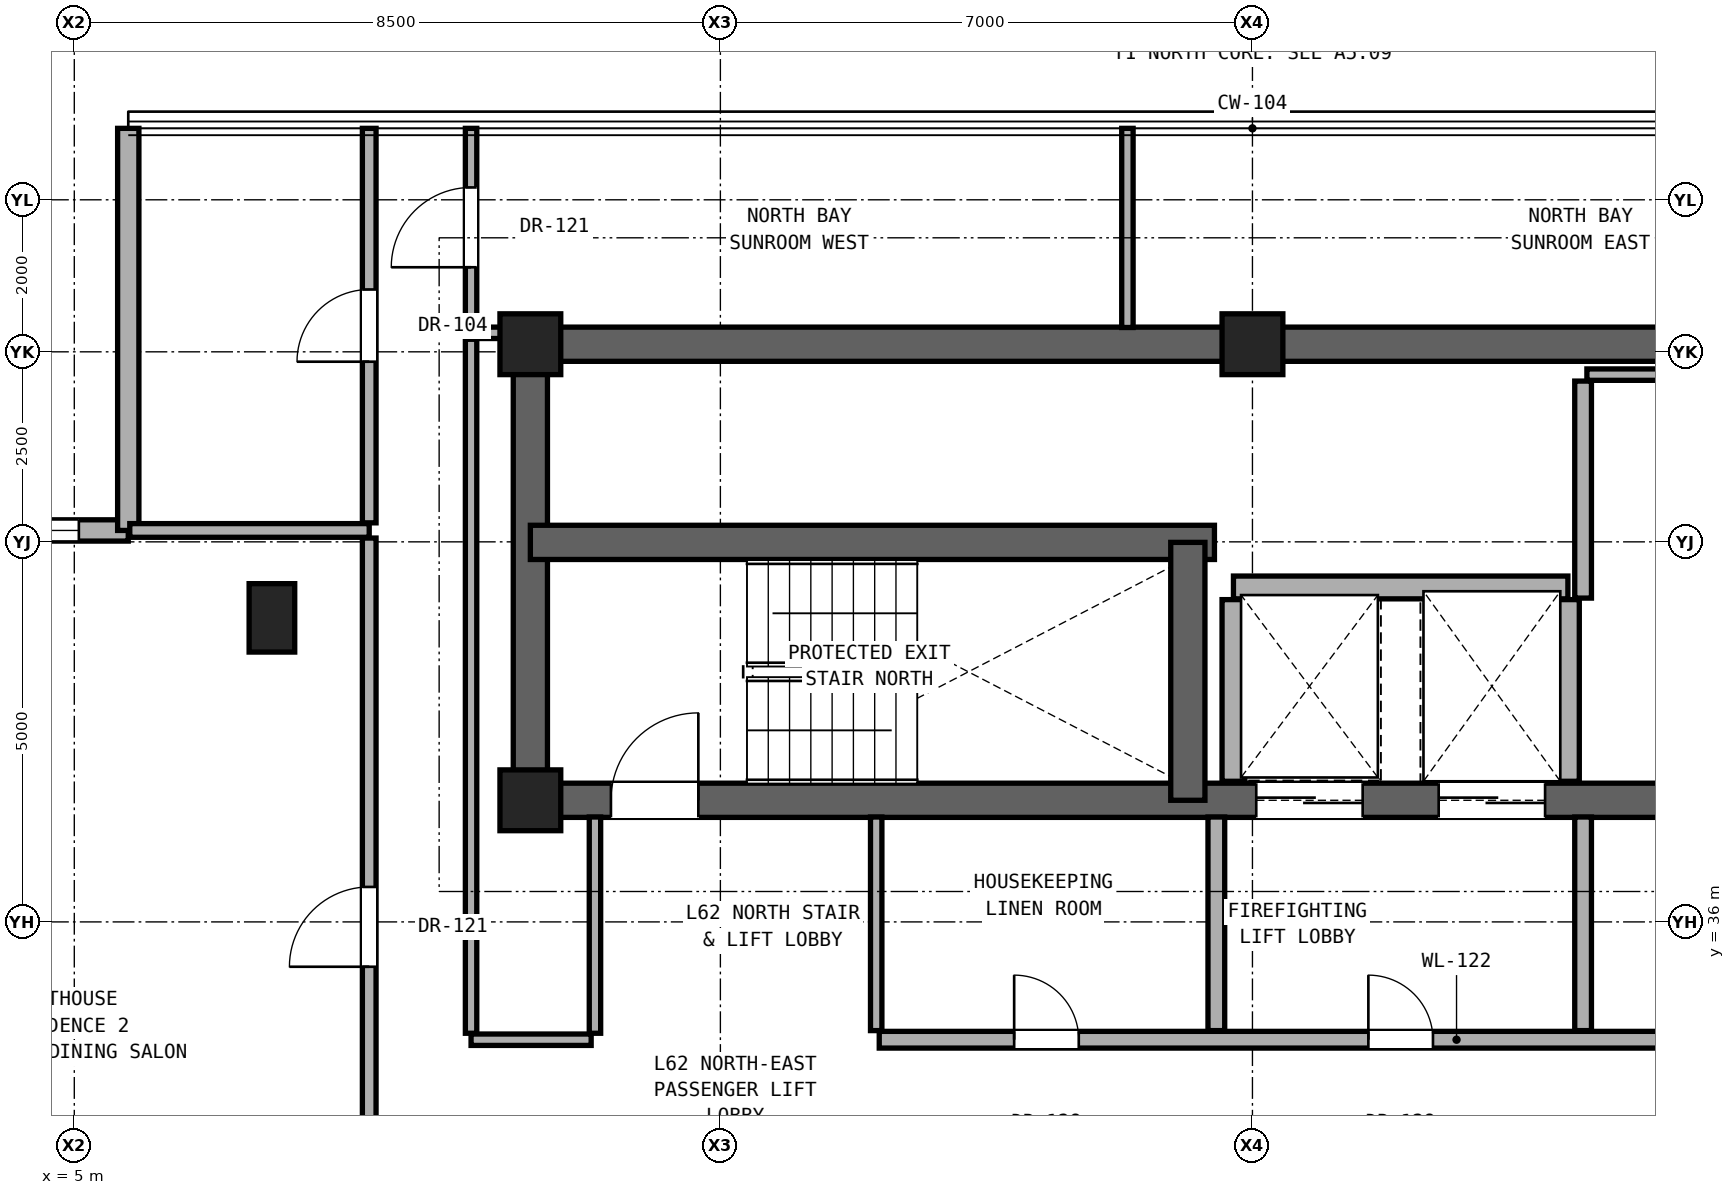
"""IFC4 building model, lengths in metres.
Left out: names, types, materials, properties, quantities, classifications, styles, units other than length and angle.
Written with IfcOpenShell. Run it as: python <this file> out.ifc"""

import sys

from ifc_helpers import new_model, si_unit, direction, frame, frame_2d, origin, origin_2d, place, context, subcontext, project, spatial, rectangle, extrude, element, fill, save


model = new_model("IFC4")
c1 = context("Model", 3, precision=1e-05, world=origin(), true_north=direction((0.0, 1.0)))
c2 = subcontext(c1, "Body", "Model", "MODEL_VIEW")
j1 = project(units=[si_unit("LENGTHUNIT", "METRE"), si_unit("PLANEANGLEUNIT", "RADIAN")], contexts=[c1])
p1 = place(None, origin())
s1 = spatial("IfcSite", under=j1, at=p1, CompositionType="ELEMENT")
p2 = place(p1, origin())
s2 = spatial("IfcBuilding", under=s1, at=p2, CompositionType="ELEMENT")
p3 = place(p2, frame((0.0, 0.0, 219.4)))
s3 = spatial("IfcBuildingStorey", under=s2, at=p3, CompositionType="ELEMENT", Elevation=219.4)
for number, where, z_axis, x_axis in (
    (1, (11.0, 37.6, 0.0), (0.0, 0.0, 1.0), (1.0, 0.0, 0.0)),
    (2, (11.0, 43.6, 0.0), (0.0, 0.0, 1.0), (1.0, 0.0, 0.0)),
    (3, (20.5, 43.6, 0.0), (0.0, 0.0, 1.0), (1.0, 0.0, 0.0)),
):
    element("IfcColumn", number, at=place(p3, frame(where, z_axis=z_axis, x_axis=x_axis)), inside=s3, PredefinedType="COLUMN", context=c2, shape_type="SweptSolid", body=[
        extrude(rectangle(XDim=0.8, YDim=0.8, at=origin_2d()), origin(), (0.0, 0.0, 1.0), 3.3),
    ])
p4 = place(p3, frame((7.6, 40.0, 0.0), z_axis=(0.0, 0.0, 1.0), x_axis=(1.0, 0.0, 0.0)))
e4 = element("IfcColumn", 4, at=p4, inside=s3, PredefinedType="PILASTER", context=c2, shape_type="SweptSolid", body=[
    extrude(rectangle(XDim=0.6, YDim=0.9, at=origin_2d()), origin(), (0.0, 0.0, 1.0), 3.3),
])
p5 = place(p3, frame((11.0, 43.6, 0.0), z_axis=(0.0, 0.0, 1.0), x_axis=(1.0, 0.0, 0.0)))
e5 = element("IfcWall", 5, at=p5, inside=s3, PredefinedType="SHEAR", context=c2, shape_type="SweptSolid", body=[
    extrude(rectangle(XDim=19.0, YDim=0.45, at=frame_2d((9.5, 0.0))), origin(), (0.0, 0.0, 1.0), 3.1),
])
p6 = place(p3, frame((11.0, 37.6, 0.0), z_axis=(0.0, 0.0, 1.0), x_axis=(0.0, 1.0, 0.0)))
e6 = element("IfcWall", 6, at=p6, inside=s3, PredefinedType="SHEAR", context=c2, shape_type="SweptSolid", body=[
    extrude(rectangle(XDim=6.0, YDim=0.45, at=frame_2d((3.0, 0.0))), origin(), (0.0, 0.0, 1.0), 3.1),
])
p7 = place(p3, frame((11.0, 37.6, 0.0), z_axis=(0.0, 0.0, 1.0), x_axis=(1.0, 0.0, 0.0)))
e7 = element("IfcWall", 7, at=p7, inside=s3, PredefinedType="SHEAR", context=c2, shape_type="SweptSolid", body=[
    extrude(rectangle(XDim=19.0, YDim=0.45, at=frame_2d((9.5, 0.0))), origin(), (0.0, 0.0, 1.0), 3.1),
])
p8 = place(p7, frame((1.06, 0.0, 0.0)))
e8 = element("IfcOpeningElement", 8, at=p8, cuts=e7, PredefinedType="OPENING", context=c2, shape_type="SweptSolid", body=[
    extrude(rectangle(XDim=1.15, YDim=2.2, at=frame_2d((0.575, 1.1))), frame((0.0, 0.235, 0.0), z_axis=(0.0, -1.0, 0.0), x_axis=(1.0, 0.0, 0.0)), (0.0, 0.0, 1.0), 0.47),
])
p9 = place(p7, frame((9.55, 0.0, 0.0)))
e9 = element("IfcOpeningElement", 9, at=p9, cuts=e7, PredefinedType="OPENING", context=c2, shape_type="SweptSolid", body=[
    extrude(rectangle(XDim=1.4, YDim=2.35, at=frame_2d((0.7, 1.175))), frame((0.0, 0.235, 0.0), z_axis=(0.0, -1.0, 0.0), x_axis=(1.0, 0.0, 0.0)), (0.0, 0.0, 1.0), 0.47),
])
p10 = place(p7, frame((11.95, 0.0, 0.0)))
e10 = element("IfcOpeningElement", 10, at=p10, cuts=e7, PredefinedType="OPENING", context=c2, shape_type="SweptSolid", body=[
    extrude(rectangle(XDim=1.4, YDim=2.35, at=frame_2d((0.7, 1.175))), frame((0.0, 0.235, 0.0), z_axis=(0.0, -1.0, 0.0), x_axis=(1.0, 0.0, 0.0)), (0.0, 0.0, 1.0), 0.47),
])
p11 = place(p3, frame((11.0, 40.993, 0.0), z_axis=(0.0, 0.0, 1.0), x_axis=(1.0, 0.0, 0.0)))
e11 = element("IfcWall", 11, at=p11, inside=s3, PredefinedType="SHEAR", context=c2, shape_type="SweptSolid", body=[
    extrude(rectangle(XDim=9.0, YDim=0.45, at=frame_2d((4.5, 0.0))), origin(), (0.0, 0.0, 1.0), 3.1),
])
p12 = place(p3, frame((19.65, 37.6, 0.0), z_axis=(0.0, 0.0, 1.0), x_axis=(0.0, 1.0, 0.0)))
e12 = element("IfcWall", 12, at=p12, inside=s3, PredefinedType="SHEAR", context=c2, shape_type="SweptSolid", body=[
    extrude(rectangle(XDim=3.393, YDim=0.45, at=frame_2d((1.696, 0.0))), origin(), (0.0, 0.0, 1.0), 3.1),
])
p13 = place(p3, frame((5.71, 41.15, 0.0), z_axis=(0.0, 0.0, 1.0), x_axis=(-1.0, 0.0, 0.0)))
e13 = element("IfcWall", 13, at=p13, inside=s3, PredefinedType="SOLIDWALL", context=c2, shape_type="SweptSolid", body=[
    extrude(rectangle(XDim=5.29, YDim=0.28, at=frame_2d((2.645, 0.0))), origin(), (0.0, 0.0, 1.0), 3.08),
])
p14 = place(p13, frame((0.65, 0.0, 0.85)))
e14 = element("IfcOpeningElement", 14, at=p14, cuts=e13, PredefinedType="OPENING", context=c2, shape_type="SweptSolid", body=[
    extrude(rectangle(XDim=1.1, YDim=2.0, at=frame_2d((0.55, 1.0))), frame((0.0, 0.15, 0.0), z_axis=(0.0, -1.0, 0.0), x_axis=(1.0, 0.0, 0.0)), (0.0, 0.0, 1.0), 0.3),
])
p15 = place(p3, frame((5.71, 46.44, 0.0), z_axis=(0.0, 0.0, 1.0), x_axis=(0.0, -1.0, 0.0)))
e15 = element("IfcWall", 15, at=p15, inside=s3, PredefinedType="SOLIDWALL", context=c2, shape_type="SweptSolid", body=[
    extrude(rectangle(XDim=5.29, YDim=0.28, at=frame_2d((2.645, 0.0))), origin(), (0.0, 0.0, 1.0), 3.08),
])
p16 = place(p3, frame((10.22, 34.45, 0.0), z_axis=(0.0, 0.0, 1.0), x_axis=(1.0, 0.0, 0.0)))
e16 = element("IfcWall", 16, at=p16, inside=s3, PredefinedType="PARTITIONING", context=c2, shape_type="SweptSolid", body=[
    extrude(rectangle(XDim=1.58, YDim=0.15, at=frame_2d((0.79, 0.0))), origin(), (0.0, 0.0, 1.0), 2.236),
])
p17 = place(p3, frame((15.59, 34.45, 0.0), z_axis=(0.0, 0.0, 1.0), x_axis=(1.0, 0.0, 0.0)))
e17 = element("IfcWall", 17, at=p17, inside=s3, PredefinedType="SOLIDWALL", context=c2, shape_type="SweptSolid", body=[
    extrude(rectangle(XDim=15.19, YDim=0.22, at=frame_2d((7.595, 0.0))), origin(), (0.0, 0.0, 1.0), 2.236),
])
p18 = place(p17, frame((6.435, 0.0, 0.0)))
e18 = element("IfcOpeningElement", 18, at=p18, cuts=e17, PredefinedType="OPENING", context=c2, shape_type="SweptSolid", body=[
    extrude(rectangle(XDim=0.85, YDim=2.01, at=frame_2d((0.425, 1.005))), frame((0.0, 0.12, 0.0), z_axis=(0.0, -1.0, 0.0), x_axis=(1.0, 0.0, 0.0)), (0.0, 0.0, 1.0), 0.24),
])
p19 = place(p17, frame((11.085, 0.0, 0.0)))
e19 = element("IfcOpeningElement", 19, at=p19, cuts=e17, PredefinedType="OPENING", context=c2, shape_type="SweptSolid", body=[
    extrude(rectangle(XDim=0.95, YDim=2.15, at=frame_2d((0.475, 1.075))), frame((0.0, 0.12, 0.0), z_axis=(0.0, -1.0, 0.0), x_axis=(1.0, 0.0, 0.0)), (0.0, 0.0, 1.0), 0.24),
])
p20 = place(p17, frame((1.775, 0.0, 0.0)))
e20 = element("IfcOpeningElement", 20, at=p20, cuts=e17, PredefinedType="OPENING", context=c2, shape_type="SweptSolid", body=[
    extrude(rectangle(XDim=0.85, YDim=2.01, at=frame_2d((0.425, 1.005))), frame((0.0, 0.12, 0.0), z_axis=(0.0, -1.0, 0.0), x_axis=(1.0, 0.0, 0.0)), (0.0, 0.0, 1.0), 0.24),
])
p21 = place(p3, frame((20.25, 40.4, 0.0), z_axis=(0.0, 0.0, 1.0), x_axis=(1.0, 0.0, 0.0)))
e21 = element("IfcWall", 21, at=p21, inside=s3, PredefinedType="SOLIDWALL", context=c2, shape_type="SweptSolid", body=[
    extrude(rectangle(XDim=4.4, YDim=0.3, at=frame_2d((2.2, 0.0))), origin(), (0.0, 0.0, 1.0), 3.1),
])
p22 = place(p3, frame((5.73, 41.15, 0.0), z_axis=(0.0, 0.0, 1.0), x_axis=(1.0, 0.0, 0.0)))
e22 = element("IfcWall", 22, at=p22, inside=s3, PredefinedType="PARTITIONING", context=c2, shape_type="SweptSolid", body=[
    extrude(rectangle(XDim=3.15, YDim=0.18, at=frame_2d((1.575, 0.0))), origin(), (0.0, 0.0, 1.0), 3.1),
])
p23 = place(p3, frame((24.9, 43.2, 0.0), z_axis=(0.0, 0.0, 1.0), x_axis=(1.0, 0.0, 0.0)))
e23 = element("IfcWall", 23, at=p23, inside=s3, PredefinedType="PARTITIONING", context=c2, shape_type="SweptSolid", body=[
    extrude(rectangle(XDim=4.5, YDim=0.15, at=frame_2d((2.25, 0.0))), origin(), (0.0, 0.0, 1.0), 3.1),
])
p24 = place(p3, frame((10.22, 43.75, 0.0), z_axis=(0.0, 0.0, 1.0), x_axis=(1.0, 0.0, 0.0)))
e24 = element("IfcWall", 24, at=p24, inside=s3, PredefinedType="PARTITIONING", context=c2, shape_type="SweptSolid", body=[
    extrude(rectangle(XDim=0.56, YDim=0.15, at=frame_2d((0.28, 0.0))), origin(), (0.0, 0.0, 1.0), 3.1),
])
p25 = place(p3, frame((8.88, 30.82, 0.0), z_axis=(0.0, 0.0, 1.0), x_axis=(0.0, 1.0, 0.0)))
e25 = element("IfcWall", 25, at=p25, inside=s3, PredefinedType="PARTITIONING", context=c2, shape_type="SweptSolid", body=[
    extrude(rectangle(XDim=10.23, YDim=0.18, at=frame_2d((5.115, 0.0))), origin(), (0.0, 0.0, 1.0), 2.396),
])
p26 = place(p25, frame((4.59, 0.0, 0.0)))
e26 = element("IfcOpeningElement", 26, at=p26, cuts=e25, PredefinedType="OPENING", context=c2, shape_type="SweptSolid", body=[
    extrude(rectangle(XDim=1.05, YDim=2.2, at=frame_2d((0.525, 1.1))), frame((0.0, 0.1, 0.0), z_axis=(0.0, -1.0, 0.0), x_axis=(1.0, 0.0, 0.0)), (0.0, 0.0, 1.0), 0.2),
])
p27 = place(p3, frame((8.88, 41.25, 0.0), z_axis=(0.0, 0.0, 1.0), x_axis=(0.0, 1.0, 0.0)))
e27 = element("IfcWall", 27, at=p27, inside=s3, PredefinedType="PARTITIONING", context=c2, shape_type="SweptSolid", body=[
    extrude(rectangle(XDim=5.19, YDim=0.18, at=frame_2d((2.595, 0.0))), origin(), (0.0, 0.0, 1.0), 3.1),
])
p28 = place(p27, frame((2.12, 0.0, 0.0)))
e28 = element("IfcOpeningElement", 28, at=p28, cuts=e27, PredefinedType="OPENING", context=c2, shape_type="SweptSolid", body=[
    extrude(rectangle(XDim=0.95, YDim=2.15, at=frame_2d((0.475, 1.075))), frame((0.0, 0.1, 0.0), z_axis=(0.0, -1.0, 0.0), x_axis=(1.0, 0.0, 0.0)), (0.0, 0.0, 1.0), 0.2),
])
p29 = place(p3, frame((10.22, 34.535, 0.0), z_axis=(0.0, 0.0, 1.0), x_axis=(0.0, 1.0, 0.0)))
e29 = element("IfcWall", 29, at=p29, inside=s3, PredefinedType="PARTITIONING", context=c2, shape_type="SweptSolid", body=[
    extrude(rectangle(XDim=9.13, YDim=0.15, at=frame_2d((4.565, 0.0))), origin(), (0.0, 0.0, 1.0), 2.492),
])
p30 = place(p3, frame((10.22, 43.835, 0.0), z_axis=(0.0, 0.0, 1.0), x_axis=(0.0, 1.0, 0.0)))
e30 = element("IfcWall", 30, at=p30, inside=s3, PredefinedType="PARTITIONING", context=c2, shape_type="SweptSolid", body=[
    extrude(rectangle(XDim=2.605, YDim=0.15, at=frame_2d((1.302, 0.0))), origin(), (0.0, 0.0, 1.0), 3.1),
])
p31 = place(p30, frame((0.778, 0.0, 0.0)))
e31 = element("IfcOpeningElement", 31, at=p31, cuts=e30, PredefinedType="OPENING", context=c2, shape_type="SweptSolid", body=[
    extrude(rectangle(XDim=1.05, YDim=2.2, at=frame_2d((0.525, 1.1))), frame((0.0, 0.085, 0.0), z_axis=(0.0, -1.0, 0.0), x_axis=(1.0, 0.0, 0.0)), (0.0, 0.0, 1.0), 0.17),
])
p32 = place(p3, frame((11.85, 34.535, 0.0), z_axis=(0.0, 0.0, 1.0), x_axis=(0.0, 1.0, 0.0)))
e32 = element("IfcWall", 32, at=p32, inside=s3, PredefinedType="PARTITIONING", context=c2, shape_type="SweptSolid", body=[
    extrude(rectangle(XDim=2.845, YDim=0.15, at=frame_2d((1.422, 0.0))), origin(), (0.0, 0.0, 1.0), 3.1),
])
p33 = place(p3, frame((15.55, 34.57, 0.0), z_axis=(0.0, 0.0, 1.0), x_axis=(0.0, 1.0, 0.0)))
e33 = element("IfcWall", 33, at=p33, inside=s3, PredefinedType="PARTITIONING", context=c2, shape_type="SweptSolid", body=[
    extrude(rectangle(XDim=2.81, YDim=0.15, at=frame_2d((1.405, 0.0))), origin(), (0.0, 0.0, 1.0), 3.1),
])
p34 = place(p3, frame((18.855, 43.82, 0.0), z_axis=(0.0, 0.0, 1.0), x_axis=(0.0, 1.0, 0.0)))
e34 = element("IfcWall", 34, at=p34, inside=s3, PredefinedType="PARTITIONING", context=c2, shape_type="SweptSolid", body=[
    extrude(rectangle(XDim=2.62, YDim=0.15, at=frame_2d((1.31, 0.0))), origin(), (0.0, 0.0, 1.0), 3.1),
])
p35 = place(p3, frame((20.025, 34.57, 0.0), z_axis=(0.0, 0.0, 1.0), x_axis=(0.0, 1.0, 0.0)))
e35 = element("IfcWall", 35, at=p35, inside=s3, PredefinedType="SOLIDWALL", context=c2, shape_type="SweptSolid", body=[
    extrude(rectangle(XDim=2.81, YDim=0.22, at=frame_2d((1.405, 0.0))), origin(), (0.0, 0.0, 1.0), 3.1),
])
for number, where, z_axis, x_axis in (
    (36, (20.25, 37.85, 0.0), (0.0, 0.0, 1.0), (0.0, 1.0, 0.0)),
    (37, (24.65, 37.85, 0.0), (0.0, 0.0, 1.0), (0.0, 1.0, 0.0)),
):
    element("IfcWall", number, at=place(p3, frame(where, z_axis=z_axis, x_axis=x_axis)), inside=s3, PredefinedType="SOLIDWALL", context=c2, shape_type="SweptSolid", body=[
        extrude(rectangle(XDim=2.39, YDim=0.3, at=frame_2d((1.195, 0.0))), origin(), (0.0, 0.0, 1.0), 3.1),
    ])
p36 = place(p3, frame((24.85, 34.57, 0.0), z_axis=(0.0, 0.0, 1.0), x_axis=(0.0, 1.0, 0.0)))
e38 = element("IfcWall", 38, at=p36, inside=s3, PredefinedType="SOLIDWALL", context=c2, shape_type="SweptSolid", body=[
    extrude(rectangle(XDim=2.81, YDim=0.22, at=frame_2d((1.405, 0.0))), origin(), (0.0, 0.0, 1.0), 3.1),
])
p37 = place(p3, frame((24.85, 40.26, 0.0), z_axis=(0.0, 0.0, 1.0), x_axis=(0.0, 1.0, 0.0)))
e39 = element("IfcWall", 39, at=p37, inside=s3, PredefinedType="SOLIDWALL", context=c2, shape_type="SweptSolid", body=[
    extrude(rectangle(XDim=2.855, YDim=0.22, at=frame_2d((1.427, 0.0))), origin(), (0.0, 0.0, 1.0), 3.1),
])
p38 = place(p14, origin())
e40 = element("IfcWindow", 40, at=p38, inside=s3, PartitioningType="SINGLE_PANEL", PredefinedType="WINDOW", context=c2, shape_type="SweptSolid", body=[
    extrude(rectangle(XDim=1.1, YDim=2.0, at=frame_2d((0.55, 1.0))), frame((0.0, 0.03, 0.0), z_axis=(0.0, -1.0, 0.0), x_axis=(1.0, 0.0, 0.0)), (0.0, 0.0, 1.0), 0.06),
])
fill(e14, e40)
p39 = place(p8, origin())
e41 = element("IfcDoor", 41, at=p39, inside=s3, OperationType="SINGLE_SWING_RIGHT", PredefinedType="DOOR", context=c2, shape_type="SweptSolid", body=[
    extrude(rectangle(XDim=1.15, YDim=2.2, at=frame_2d((0.575, 1.1))), frame((0.0, 0.025, 0.0), z_axis=(0.0, -1.0, 0.0), x_axis=(1.0, 0.0, 0.0)), (0.0, 0.0, 1.0), 0.05),
])
fill(e8, e41)
p40 = place(p18, origin())
e42 = element("IfcDoor", 42, at=p40, inside=s3, OperationType="SINGLE_SWING_LEFT", PredefinedType="DOOR", context=c2, shape_type="SweptSolid", body=[
    extrude(rectangle(XDim=0.85, YDim=2.01, at=frame_2d((0.425, 1.005))), frame((0.0, 0.025, 0.0), z_axis=(0.0, -1.0, 0.0), x_axis=(1.0, 0.0, 0.0)), (0.0, 0.0, 1.0), 0.05),
])
fill(e18, e42)
p41 = place(p20, origin())
e43 = element("IfcDoor", 43, at=p41, inside=s3, OperationType="SINGLE_SWING_LEFT", PredefinedType="DOOR", context=c2, shape_type="SweptSolid", body=[
    extrude(rectangle(XDim=0.85, YDim=2.01, at=frame_2d((0.425, 1.005))), frame((0.0, 0.025, 0.0), z_axis=(0.0, -1.0, 0.0), x_axis=(1.0, 0.0, 0.0)), (0.0, 0.0, 1.0), 0.05),
])
fill(e20, e43)
p42 = place(p26, origin())
e44 = element("IfcDoor", 44, at=p42, inside=s3, OperationType="SINGLE_SWING_LEFT", PredefinedType="DOOR", context=c2, shape_type="SweptSolid", body=[
    extrude(rectangle(XDim=1.05, YDim=2.2, at=frame_2d((0.525, 1.1))), frame((0.0, 0.025, 0.0), z_axis=(0.0, -1.0, 0.0), x_axis=(1.0, 0.0, 0.0)), (0.0, 0.0, 1.0), 0.05),
])
fill(e26, e44)
p43 = place(p31, origin())
e45 = element("IfcDoor", 45, at=p43, inside=s3, OperationType="SINGLE_SWING_LEFT", PredefinedType="DOOR", context=c2, shape_type="SweptSolid", body=[
    extrude(rectangle(XDim=1.05, YDim=2.2, at=frame_2d((0.525, 1.1))), frame((0.0, 0.025, 0.0), z_axis=(0.0, -1.0, 0.0), x_axis=(1.0, 0.0, 0.0)), (0.0, 0.0, 1.0), 0.05),
])
fill(e31, e45)
p44 = place(p28, origin())
e46 = element("IfcDoor", 46, at=p44, inside=s3, OperationType="SINGLE_SWING_LEFT", PredefinedType="DOOR", context=c2, shape_type="SweptSolid", body=[
    extrude(rectangle(XDim=0.95, YDim=2.15, at=frame_2d((0.475, 1.075))), frame((0.0, 0.025, 0.0), z_axis=(0.0, -1.0, 0.0), x_axis=(1.0, 0.0, 0.0)), (0.0, 0.0, 1.0), 0.05),
])
fill(e28, e46)
p45 = place(p9, origin())
e47 = element("IfcDoor", 47, at=p45, inside=s3, OperationType="DOUBLE_DOOR_SLIDING", PredefinedType="DOOR", context=c2, shape_type="SweptSolid", body=[
    extrude(rectangle(XDim=1.4, YDim=2.35, at=frame_2d((0.7, 1.175))), frame((0.0, 0.025, 0.0), z_axis=(0.0, -1.0, 0.0), x_axis=(1.0, 0.0, 0.0)), (0.0, 0.0, 1.0), 0.05),
])
fill(e9, e47)
p46 = place(p10, origin())
e48 = element("IfcDoor", 48, at=p46, inside=s3, OperationType="DOUBLE_DOOR_SLIDING", PredefinedType="DOOR", context=c2, shape_type="SweptSolid", body=[
    extrude(rectangle(XDim=1.4, YDim=2.35, at=frame_2d((0.7, 1.175))), frame((0.0, 0.025, 0.0), z_axis=(0.0, -1.0, 0.0), x_axis=(1.0, 0.0, 0.0)), (0.0, 0.0, 1.0), 0.05),
])
fill(e10, e48)
save(model, sys.argv[1])
